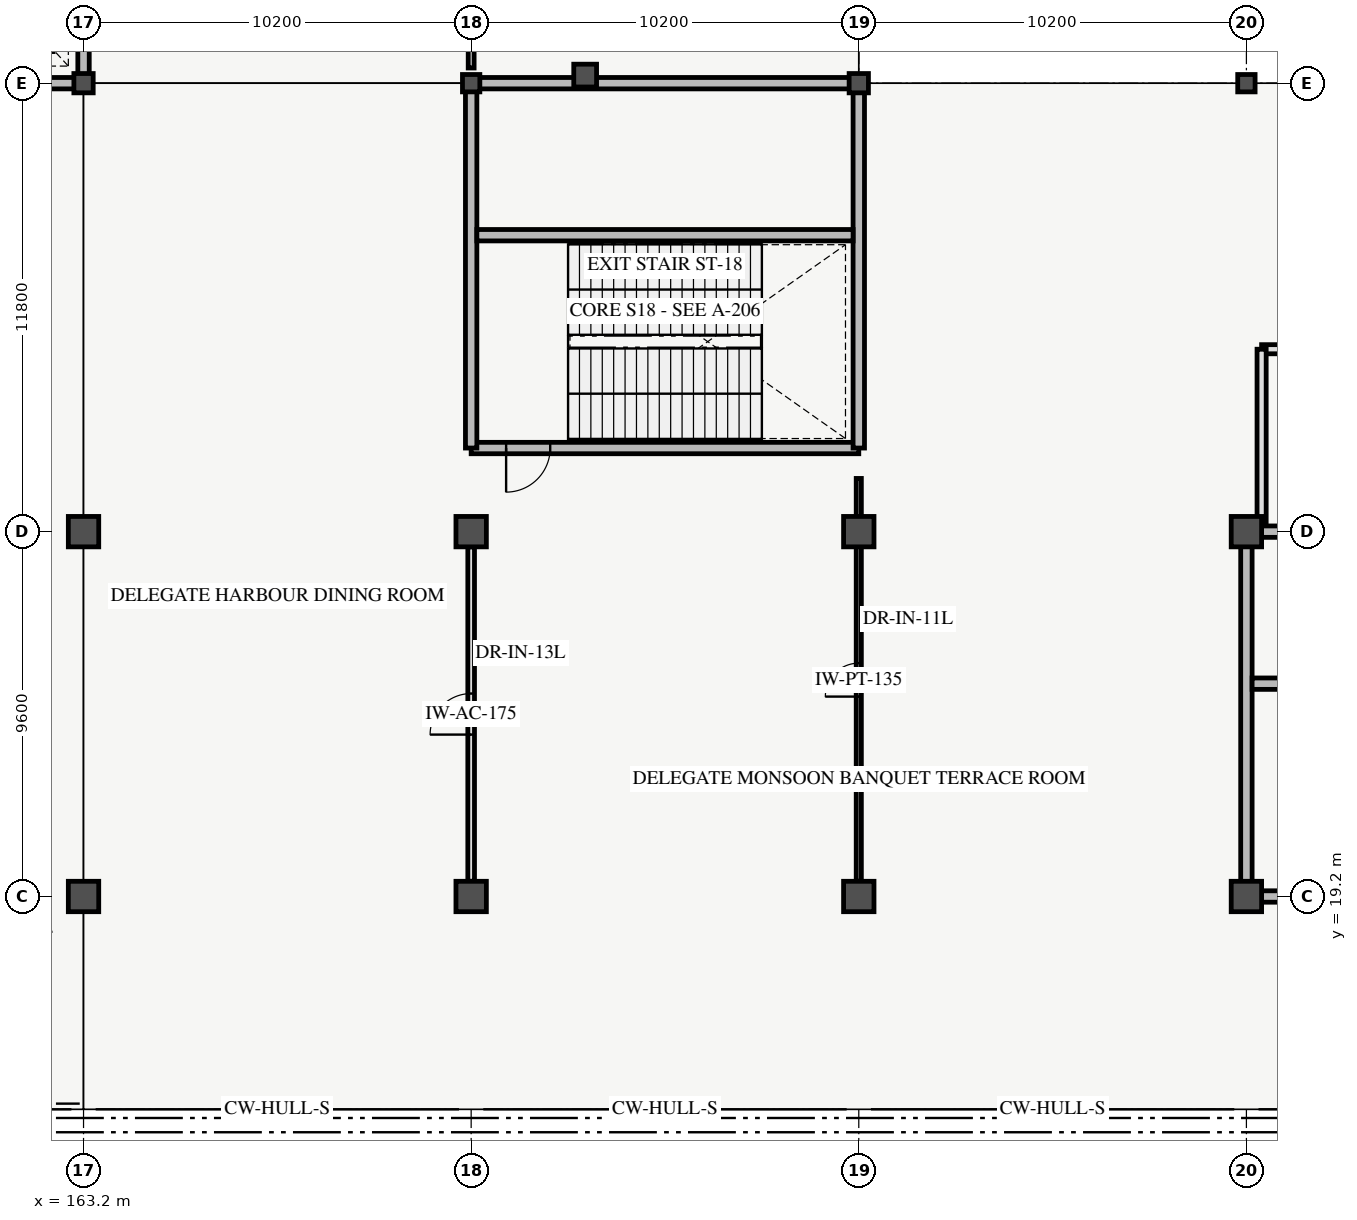
"""IFC4 building model, lengths in metres.
Left out: names, types, materials, properties, quantities, classifications, styles, units other than length and angle.
Written with IfcOpenShell. Run it as: python <this file> out.ifc"""

import sys

from ifc_helpers import new_model, si_unit, direction, frame, frame_2d, origin, origin_2d, place, context, subcontext, project, spatial, rectangle, circle, hollow_circle, extrude, element, fill, save


model = new_model("IFC4")
c1 = context("Model", 3, precision=1e-05, world=origin(), true_north=direction((0.0, 1.0)))
c2 = subcontext(c1, "Body", "Model", "MODEL_VIEW")
j1 = project(units=[si_unit("LENGTHUNIT", "METRE"), si_unit("PLANEANGLEUNIT", "RADIAN")], contexts=[c1])
p1 = place(None, origin())
s1 = spatial("IfcSite", under=j1, at=p1, CompositionType="ELEMENT")
p2 = place(p1, origin())
s2 = spatial("IfcBuilding", under=s1, at=p2, CompositionType="ELEMENT")
p3 = place(p2, frame((0.0, 0.0, 5.4)))
s3 = spatial("IfcBuildingStorey", under=s2, at=p3, CompositionType="ELEMENT", Elevation=5.4)
for number, where, z_axis, x_axis in (
    (1, (163.2, 19.2, 0.0), (0.0, 0.0, 1.0), (1.0, 0.0, 0.0)),
    (2, (163.2, 28.8, 0.0), (0.0, 0.0, 1.0), (1.0, 0.0, 0.0)),
):
    element("IfcColumn", number, at=place(p3, frame(where, z_axis=z_axis, x_axis=x_axis)), inside=s3, PredefinedType="COLUMN", context=c2, shape_type="SweptSolid", body=[
        extrude(circle(Radius=0.4, at=origin_2d()), origin(), (0.0, 0.0, 1.0), 5.4),
    ])
p4 = place(p3, frame((163.2, 40.6, 0.0), z_axis=(0.0, 0.0, 1.0), x_axis=(1.0, 0.0, 0.0)))
e3 = element("IfcColumn", 3, at=p4, inside=s3, PredefinedType="COLUMN", context=c2, shape_type="SweptSolid", body=[
    extrude(hollow_circle(Radius=0.254, WallThickness=0.02, at=origin_2d()), origin(), (0.0, 0.0, 1.0), 5.4),
])
for number, where, z_axis, x_axis in (
    (4, (173.4, 19.2, 0.0), (0.0, 0.0, 1.0), (1.0, 0.0, 0.0)),
    (5, (173.4, 28.8, 0.0), (0.0, 0.0, 1.0), (1.0, 0.0, 0.0)),
):
    element("IfcColumn", number, at=place(p3, frame(where, z_axis=z_axis, x_axis=x_axis)), inside=s3, PredefinedType="COLUMN", context=c2, shape_type="SweptSolid", body=[
        extrude(rectangle(XDim=0.8, YDim=0.8, at=origin_2d()), origin(), (0.0, 0.0, 1.0), 5.4),
    ])
p5 = place(p3, frame((173.4, 40.6, 0.0), z_axis=(0.0, 0.0, 1.0), x_axis=(1.0, 0.0, 0.0)))
e6 = element("IfcColumn", 6, at=p5, inside=s3, PredefinedType="COLUMN", context=c2, shape_type="SweptSolid", body=[
    extrude(hollow_circle(Radius=0.229, WallThickness=0.02, at=origin_2d()), origin(), (0.0, 0.0, 1.0), 5.4),
])
for number, where, z_axis, x_axis in (
    (7, (183.6, 19.2, 0.0), (0.0, 0.0, 1.0), (1.0, 0.0, 0.0)),
    (8, (183.6, 28.8, 0.0), (0.0, 0.0, 1.0), (1.0, 0.0, 0.0)),
):
    element("IfcColumn", number, at=place(p3, frame(where, z_axis=z_axis, x_axis=x_axis)), inside=s3, PredefinedType="COLUMN", context=c2, shape_type="SweptSolid", body=[
        extrude(rectangle(XDim=0.8, YDim=0.8, at=origin_2d()), origin(), (0.0, 0.0, 1.0), 5.4),
    ])
p6 = place(p3, frame((183.6, 40.6, 0.0), z_axis=(0.0, 0.0, 1.0), x_axis=(1.0, 0.0, 0.0)))
e9 = element("IfcColumn", 9, at=p6, inside=s3, PredefinedType="COLUMN", context=c2, shape_type="SweptSolid", body=[
    extrude(hollow_circle(Radius=0.254, WallThickness=0.02, at=origin_2d()), origin(), (0.0, 0.0, 1.0), 5.4),
])
for number, where, z_axis, x_axis in (
    (10, (193.8, 19.2, 0.0), (0.0, 0.0, 1.0), (1.0, 0.0, 0.0)),
    (11, (193.8, 28.8, 0.0), (0.0, 0.0, 1.0), (1.0, 0.0, 0.0)),
):
    element("IfcColumn", number, at=place(p3, frame(where, z_axis=z_axis, x_axis=x_axis)), inside=s3, PredefinedType="COLUMN", context=c2, shape_type="SweptSolid", body=[
        extrude(rectangle(XDim=0.8, YDim=0.8, at=origin_2d()), origin(), (0.0, 0.0, 1.0), 5.4),
    ])
p7 = place(p3, frame((193.8, 40.6, 0.0), z_axis=(0.0, 0.0, 1.0), x_axis=(1.0, 0.0, 0.0)))
e12 = element("IfcColumn", 12, at=p7, inside=s3, PredefinedType="COLUMN", context=c2, shape_type="SweptSolid", body=[
    extrude(hollow_circle(Radius=0.229, WallThickness=0.02, at=origin_2d()), origin(), (0.0, 0.0, 1.0), 5.4),
])
p8 = place(p3, frame((153.0, 40.6, 0.0), z_axis=(0.0, 0.0, 1.0), x_axis=(1.0, 0.0, 0.0)))
e13 = element("IfcWall", 13, at=p8, inside=s3, PredefinedType="SHEAR", context=c2, shape_type="SweptSolid", body=[
    extrude(rectangle(XDim=10.2, YDim=0.3, at=frame_2d((5.1, 0.0))), origin(), (0.0, 0.0, 1.0), 5.4),
])
p9 = place(p8, frame((7.4, 0.0, 0.0)))
e14 = element("IfcOpeningElement", 14, at=p9, cuts=e13, PredefinedType="OPENING", context=c2, shape_type="SweptSolid", body=[
    extrude(rectangle(XDim=1.2, YDim=2.25, at=frame_2d((0.6, 1.125))), frame((0.0, 0.16, 0.0), z_axis=(0.0, -1.0, 0.0), x_axis=(1.0, 0.0, 0.0)), (0.0, 0.0, 1.0), 0.32),
])
p10 = place(p3, frame((163.2, 40.6, 0.0), z_axis=(0.0, 0.0, 1.0), x_axis=(0.0, 1.0, 0.0)))
e15 = element("IfcWall", 15, at=p10, inside=s3, PredefinedType="SHEAR", context=c2, shape_type="SweptSolid", body=[
    extrude(rectangle(XDim=11.8, YDim=0.3, at=frame_2d((5.9, 0.0))), origin(), (0.0, 0.0, 1.0), 5.4),
])
p11 = place(p3, frame((193.8, 19.2, 0.0), z_axis=(0.0, 0.0, 1.0), x_axis=(1.0, 0.0, 0.0)))
e16 = element("IfcWall", 16, at=p11, inside=s3, PredefinedType="SHEAR", context=c2, shape_type="SweptSolid", body=[
    extrude(rectangle(XDim=10.2, YDim=0.3, at=frame_2d((5.1, 0.0))), origin(), (0.0, 0.0, 1.0), 5.4),
])
p12 = place(p11, frame((0.92, 0.0, 0.0)))
e17 = element("IfcOpeningElement", 17, at=p12, cuts=e16, PredefinedType="OPENING", context=c2, shape_type="SweptSolid", body=[
    extrude(rectangle(XDim=1.16, YDim=2.2, at=frame_2d((0.58, 1.1))), frame((0.0, 0.16, 0.0), z_axis=(0.0, -1.0, 0.0), x_axis=(1.0, 0.0, 0.0)), (0.0, 0.0, 1.0), 0.32),
])
p13 = place(p3, frame((193.8, 28.8, 0.0), z_axis=(0.0, 0.0, 1.0), x_axis=(1.0, 0.0, 0.0)))
e18 = element("IfcWall", 18, at=p13, inside=s3, PredefinedType="SHEAR", context=c2, shape_type="SweptSolid", body=[
    extrude(rectangle(XDim=10.2, YDim=0.3, at=frame_2d((5.1, 0.0))), origin(), (0.0, 0.0, 1.0), 5.4),
])
p14 = place(p13, frame((7.4, 0.0, 0.0)))
e19 = element("IfcOpeningElement", 19, at=p14, cuts=e18, PredefinedType="OPENING", context=c2, shape_type="SweptSolid", body=[
    extrude(rectangle(XDim=1.2, YDim=2.25, at=frame_2d((0.6, 1.125))), frame((0.0, 0.16, 0.0), z_axis=(0.0, -1.0, 0.0), x_axis=(1.0, 0.0, 0.0)), (0.0, 0.0, 1.0), 0.32),
])
p15 = place(p3, frame((193.8, 19.2, 0.0), z_axis=(0.0, 0.0, 1.0), x_axis=(0.0, 1.0, 0.0)))
e20 = element("IfcWall", 20, at=p15, inside=s3, PredefinedType="SHEAR", context=c2, shape_type="SweptSolid", body=[
    extrude(rectangle(XDim=9.6, YDim=0.3, at=frame_2d((4.8, 0.0))), origin(), (0.0, 0.0, 1.0), 5.4),
])
p16 = place(p3, frame((176.4, 40.8, 0.0), z_axis=(0.0, 0.0, 1.0), x_axis=(1.0, 0.0, 0.0)))
e21 = element("IfcColumn", 21, at=p16, inside=s3, PredefinedType="COLUMN", context=c2, shape_type="SweptSolid", body=[
    extrude(rectangle(XDim=0.6, YDim=0.6, at=origin_2d()), origin(), (0.0, 0.0, 1.0), 5.12),
])
p17 = place(p3, frame((193.95, 24.8, 0.0), z_axis=(0.0, 0.0, 1.0), x_axis=(1.0, 0.0, 0.0)))
e22 = element("IfcWall", 22, at=p17, inside=s3, PredefinedType="SHEAR", context=c2, shape_type="SweptSolid", body=[
    extrude(rectangle(XDim=9.9, YDim=0.3, at=frame_2d((4.95, 0.0))), origin(), (0.0, 0.0, 1.0), 5.4),
])
p18 = place(p3, frame((173.4, 31.0, 0.0), z_axis=(0.0, 0.0, 1.0), x_axis=(1.0, 0.0, 0.0)))
e23 = element("IfcWall", 23, at=p18, inside=s3, PredefinedType="SHEAR", context=c2, shape_type="SweptSolid", body=[
    extrude(rectangle(XDim=10.2, YDim=0.3, at=frame_2d((5.1, 0.0))), origin(), (0.0, 0.0, 1.0), 5.4),
])
p19 = place(p18, frame((0.92, 0.0, 0.0)))
e24 = element("IfcOpeningElement", 24, at=p19, cuts=e23, PredefinedType="OPENING", context=c2, shape_type="SweptSolid", body=[
    extrude(rectangle(XDim=1.16, YDim=2.2, at=frame_2d((0.58, 1.1))), frame((0.0, 0.16, 0.0), z_axis=(0.0, -1.0, 0.0), x_axis=(1.0, 0.0, 0.0)), (0.0, 0.0, 1.0), 0.32),
])
p20 = place(p3, frame((173.4, 40.6, 0.0), z_axis=(0.0, 0.0, 1.0), x_axis=(1.0, 0.0, 0.0)))
e25 = element("IfcWall", 25, at=p20, inside=s3, PredefinedType="SHEAR", context=c2, shape_type="SweptSolid", body=[
    extrude(rectangle(XDim=10.2, YDim=0.3, at=frame_2d((5.1, 0.0))), origin(), (0.0, 0.0, 1.0), 5.4),
])
for number, where, z_axis, x_axis in (
    (26, (173.4, 31.0, 0.0), (0.0, 0.0, 1.0), (0.0, 1.0, 0.0)),
    (27, (183.6, 31.0, 0.0), (0.0, 0.0, 1.0), (0.0, 1.0, 0.0)),
):
    element("IfcWall", number, at=place(p3, frame(where, z_axis=z_axis, x_axis=x_axis)), inside=s3, PredefinedType="SHEAR", context=c2, shape_type="SweptSolid", body=[
        extrude(rectangle(XDim=9.6, YDim=0.3, at=frame_2d((4.8, 0.0))), origin(), (0.0, 0.0, 1.0), 5.4),
    ])
p21 = place(p3, frame((173.55, 36.6, 0.0), z_axis=(0.0, 0.0, 1.0), x_axis=(1.0, 0.0, 0.0)))
e28 = element("IfcWall", 28, at=p21, inside=s3, PredefinedType="SHEAR", context=c2, shape_type="SweptSolid", body=[
    extrude(rectangle(XDim=9.9, YDim=0.3, at=frame_2d((4.95, 0.0))), origin(), (0.0, 0.0, 1.0), 5.4),
])
p22 = place(p3, frame((194.2, 33.6, 0.0), z_axis=(0.0, 0.0, 1.0), x_axis=(1.0, 0.0, 0.0)))
e29 = element("IfcWall", 29, at=p22, inside=s3, PredefinedType="PARTITIONING", context=c2, shape_type="SweptSolid", body=[
    extrude(rectangle(XDim=9.4, YDim=0.24, at=frame_2d((4.7, 0.0))), origin(), (0.0, 0.0, 1.0), 4.2),
])
p23 = place(p22, frame((3.75, 0.0, 0.0)))
e30 = element("IfcOpeningElement", 30, at=p23, cuts=e29, PredefinedType="OPENING", context=c2, shape_type="SweptSolid", body=[
    extrude(rectangle(XDim=1.9, YDim=2.25, at=frame_2d((0.95, 1.125))), frame((0.0, 0.13, 0.0), z_axis=(0.0, -1.0, 0.0), x_axis=(1.0, 0.0, 0.0)), (0.0, 0.0, 1.0), 0.26),
])
p24 = place(p3, frame((194.2, 29.0, 0.0), z_axis=(0.0, 0.0, 1.0), x_axis=(0.0, 1.0, 0.0)))
e31 = element("IfcWall", 31, at=p24, inside=s3, PredefinedType="PARTITIONING", context=c2, shape_type="SweptSolid", body=[
    extrude(rectangle(XDim=4.6, YDim=0.24, at=frame_2d((2.3, 0.0))), origin(), (0.0, 0.0, 1.0), 4.2),
])
p25 = place(p3, frame((173.4, 41.0, 0.0), z_axis=(0.0, 0.0, 1.0), x_axis=(0.0, 1.0, 0.0)))
e32 = element("IfcWall", 32, at=p25, inside=s3, PredefinedType="PARTITIONING", context=c2, shape_type="SweptSolid", body=[
    extrude(rectangle(XDim=11.0, YDim=0.155, at=frame_2d((5.5, 0.0))), origin(), (0.0, 0.0, 1.0), 4.2),
])
p26 = place(p25, frame((4.425, 0.0, 0.0)))
e33 = element("IfcOpeningElement", 33, at=p26, cuts=e32, PredefinedType="OPENING", context=c2, shape_type="SweptSolid", body=[
    extrude(rectangle(XDim=2.15, YDim=2.38, at=frame_2d((1.075, 1.19))), frame((0.0, 0.087, 0.0), z_axis=(0.0, -1.0, 0.0), x_axis=(1.0, 0.0, 0.0)), (0.0, 0.0, 1.0), 0.175),
])
p27 = place(p3, frame((173.4, 19.6, 0.0), z_axis=(0.0, 0.0, 1.0), x_axis=(0.0, 1.0, 0.0)))
e34 = element("IfcWall", 34, at=p27, inside=s3, PredefinedType="PARTITIONING", context=c2, shape_type="SweptSolid", body=[
    extrude(rectangle(XDim=8.8, YDim=0.175, at=frame_2d((4.4, 0.0))), origin(), (0.0, 0.0, 1.0), 4.2),
])
p28 = place(p27, frame((3.86, 0.0, 0.0)))
e35 = element("IfcOpeningElement", 35, at=p28, cuts=e34, PredefinedType="OPENING", context=c2, shape_type="SweptSolid", body=[
    extrude(rectangle(XDim=1.08, YDim=2.18, at=frame_2d((0.54, 1.09))), frame((0.0, 0.097, 0.0), z_axis=(0.0, -1.0, 0.0), x_axis=(1.0, 0.0, 0.0)), (0.0, 0.0, 1.0), 0.195),
])
p29 = place(p3, frame((183.6, 19.6, 0.0), z_axis=(0.0, 0.0, 1.0), x_axis=(0.0, 1.0, 0.0)))
e36 = element("IfcWall", 36, at=p29, inside=s3, PredefinedType="PARTITIONING", context=c2, shape_type="SweptSolid", body=[
    extrude(rectangle(XDim=10.6, YDim=0.135, at=frame_2d((5.3, 0.0))), origin(), (0.0, 0.0, 1.0), 4.2),
])
p30 = place(p29, frame((4.86, 0.0, 0.0)))
e37 = element("IfcOpeningElement", 37, at=p30, cuts=e36, PredefinedType="OPENING", context=c2, shape_type="SweptSolid", body=[
    extrude(rectangle(XDim=0.88, YDim=2.08, at=frame_2d((0.44, 1.04))), frame((0.0, 0.077, 0.0), z_axis=(0.0, -1.0, 0.0), x_axis=(1.0, 0.0, 0.0)), (0.0, 0.0, 1.0), 0.155),
])
p31 = place(p19, origin())
e38 = element("IfcDoor", 38, at=p31, inside=s3, OperationType="SINGLE_SWING_LEFT", PredefinedType="DOOR", context=c2, shape_type="SweptSolid", body=[
    extrude(rectangle(XDim=1.16, YDim=2.2, at=frame_2d((0.58, 1.1))), frame((0.0, 0.025, 0.0), z_axis=(0.0, -1.0, 0.0), x_axis=(1.0, 0.0, 0.0)), (0.0, 0.0, 1.0), 0.05),
])
fill(e24, e38)
p32 = place(p28, origin())
e39 = element("IfcDoor", 39, at=p32, inside=s3, OperationType="SINGLE_SWING_LEFT", PredefinedType="DOOR", context=c2, shape_type="SweptSolid", body=[
    extrude(rectangle(XDim=1.08, YDim=2.18, at=frame_2d((0.54, 1.09))), frame((0.0, 0.025, 0.0), z_axis=(0.0, -1.0, 0.0), x_axis=(1.0, 0.0, 0.0)), (0.0, 0.0, 1.0), 0.05),
])
fill(e35, e39)
p33 = place(p30, origin())
e40 = element("IfcDoor", 40, at=p33, inside=s3, OperationType="SINGLE_SWING_LEFT", PredefinedType="DOOR", context=c2, shape_type="SweptSolid", body=[
    extrude(rectangle(XDim=0.88, YDim=2.08, at=frame_2d((0.44, 1.04))), frame((0.0, 0.025, 0.0), z_axis=(0.0, -1.0, 0.0), x_axis=(1.0, 0.0, 0.0)), (0.0, 0.0, 1.0), 0.05),
])
fill(e37, e40)
save(model, sys.argv[1])
